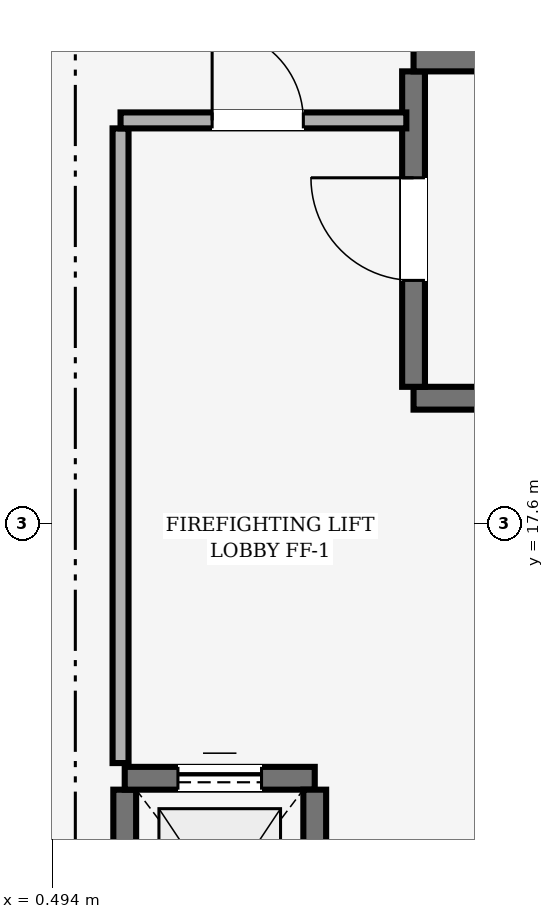
"""IFC4 building model, lengths in metres.
Left out: names, types, materials, properties, quantities, classifications, styles, units other than length and angle.
Written with IfcOpenShell. Run it as: python <this file> out.ifc"""

import sys

from ifc_helpers import new_model, si_unit, direction, frame, frame_2d, origin, place, context, subcontext, project, spatial, rectangle, extrude, element, fill, save


model = new_model("IFC4")
c1 = context("Model", 3, precision=1e-05, world=origin(), true_north=direction((0.0, 1.0)))
c2 = subcontext(c1, "Body", "Model", "MODEL_VIEW")
j1 = project(units=[si_unit("LENGTHUNIT", "METRE"), si_unit("PLANEANGLEUNIT", "RADIAN")], contexts=[c1])
p1 = place(None, origin())
s1 = spatial("IfcSite", under=j1, at=p1, CompositionType="ELEMENT")
p2 = place(p1, origin())
s2 = spatial("IfcBuilding", under=s1, at=p2, CompositionType="ELEMENT")
p3 = place(p2, frame((0.0, 0.0, 25.5)))
s3 = spatial("IfcBuildingStorey", under=s2, at=p3, CompositionType="ELEMENT", Elevation=25.5)
p4 = place(p3, frame((15.43, 19.25, 0.0), z_axis=(0.0, 0.0, 1.0), x_axis=(-1.0, 0.0, 0.0)))
e1 = element("IfcWall", 1, at=p4, inside=s3, PredefinedType="SHEAR", context=c2, shape_type="SweptSolid", body=[
    extrude(rectangle(XDim=10.18, YDim=0.3, at=frame_2d((5.09, 0.0))), origin(), (0.0, 0.0, 1.0), 2.91),
])
p5 = place(p3, frame((5.25, 19.4, 0.0), z_axis=(0.0, 0.0, 1.0), x_axis=(0.0, 1.0, 0.0)))
e2 = element("IfcWall", 2, at=p5, inside=s3, PredefinedType="SHEAR", context=c2, shape_type="SweptSolid", body=[
    extrude(rectangle(XDim=4.15, YDim=0.3, at=frame_2d((2.075, 0.0))), origin(), (0.0, 0.0, 1.0), 2.91),
])
p6 = place(p5, frame((1.4, 0.0, 0.0)))
e3 = element("IfcOpeningElement", 3, at=p6, cuts=e2, PredefinedType="OPENING", context=c2, shape_type="SweptSolid", body=[
    extrude(rectangle(XDim=1.35, YDim=2.2, at=frame_2d((0.675, 1.1))), frame((0.0, 0.15, 0.0), z_axis=(0.0, -1.0, 0.0), x_axis=(1.0, 0.0, 0.0)), (0.0, 0.0, 1.0), 0.3),
])
p7 = place(p3, frame((5.25, 23.7, 0.0), z_axis=(0.0, 0.0, 1.0), x_axis=(1.0, 0.0, 0.0)))
e4 = element("IfcWall", 4, at=p7, inside=s3, PredefinedType="SHEAR", context=c2, shape_type="SweptSolid", body=[
    extrude(rectangle(XDim=10.18, YDim=0.3, at=frame_2d((5.09, 0.0))), origin(), (0.0, 0.0, 1.0), 2.91),
])
p8 = place(p3, frame((1.45, 11.2, 0.0), z_axis=(0.0, 0.0, 1.0), x_axis=(0.0, 1.0, 0.0)))
e5 = element("IfcWall", 5, at=p8, inside=s3, PredefinedType="SHEAR", context=c2, shape_type="SweptSolid", body=[
    extrude(rectangle(XDim=2.9, YDim=0.3, at=frame_2d((1.45, 0.0))), origin(), (0.0, 0.0, 1.0), 2.91),
])
p9 = place(p3, frame((1.45, 14.25, 0.0), z_axis=(0.0, 0.0, 1.0), x_axis=(1.0, 0.0, 0.0)))
e6 = element("IfcWall", 6, at=p9, inside=s3, PredefinedType="SHEAR", context=c2, shape_type="SweptSolid", body=[
    extrude(rectangle(XDim=2.5, YDim=0.3, at=frame_2d((1.25, 0.0))), origin(), (0.0, 0.0, 1.0), 2.91),
])
p10 = place(p9, frame((0.7, 0.0, 0.0)))
e7 = element("IfcOpeningElement", 7, at=p10, cuts=e6, PredefinedType="OPENING", context=c2, shape_type="SweptSolid", body=[
    extrude(rectangle(XDim=1.1, YDim=2.1, at=frame_2d((0.55, 1.05))), frame((0.0, 0.15, 0.0), z_axis=(0.0, -1.0, 0.0), x_axis=(1.0, 0.0, 0.0)), (0.0, 0.0, 1.0), 0.3),
])
p11 = place(p3, frame((3.95, 14.1, 0.0), z_axis=(0.0, 0.0, 1.0), x_axis=(0.0, -1.0, 0.0)))
e8 = element("IfcWall", 8, at=p11, inside=s3, PredefinedType="SHEAR", context=c2, shape_type="SweptSolid", body=[
    extrude(rectangle(XDim=2.9, YDim=0.3, at=frame_2d((1.45, 0.0))), origin(), (0.0, 0.0, 1.0), 2.91),
])
p12 = place(p3, frame((1.395, 14.45, 0.0), z_axis=(0.0, 0.0, 1.0), x_axis=(0.0, 1.0, 0.0)))
e9 = element("IfcWall", 9, at=p12, inside=s3, PredefinedType="PARTITIONING", context=c2, shape_type="SweptSolid", body=[
    extrude(rectangle(XDim=8.35, YDim=0.21, at=frame_2d((4.175, 0.0))), origin(), (0.0, 0.0, 1.0), 2.89),
])
p13 = place(p3, frame((1.395, 22.905, 0.0), z_axis=(0.0, 0.0, 1.0), x_axis=(1.0, 0.0, 0.0)))
e10 = element("IfcWall", 10, at=p13, inside=s3, PredefinedType="PARTITIONING", context=c2, shape_type="SweptSolid", body=[
    extrude(rectangle(XDim=3.76, YDim=0.21, at=frame_2d((1.88, 0.0))), origin(), (0.0, 0.0, 1.0), 2.89),
])
p14 = place(p13, frame((1.205, 0.0, 0.0)))
e11 = element("IfcOpeningElement", 11, at=p14, cuts=e10, PredefinedType="OPENING", context=c2, shape_type="SweptSolid", body=[
    extrude(rectangle(XDim=1.2, YDim=2.15, at=frame_2d((0.6, 1.075))), frame((0.0, 0.105, 0.0), z_axis=(0.0, -1.0, 0.0), x_axis=(1.0, 0.0, 0.0)), (0.0, 0.0, 1.0), 0.21),
])
p15 = place(p6, origin())
e12 = element("IfcDoor", 12, at=p15, inside=s3, OperationType="SINGLE_SWING_RIGHT", PredefinedType="DOOR", context=c2, shape_type="SweptSolid", body=[
    extrude(rectangle(XDim=1.35, YDim=2.2, at=frame_2d((0.675, 1.1))), frame((0.0, 0.025, 0.0), z_axis=(0.0, -1.0, 0.0), x_axis=(1.0, 0.0, 0.0)), (0.0, 0.0, 1.0), 0.05),
])
fill(e3, e12)
p16 = place(p10, origin())
e13 = element("IfcDoor", 13, at=p16, inside=s3, OperationType="SLIDING_TO_LEFT", PredefinedType="DOOR", context=c2, shape_type="SweptSolid", body=[
    extrude(rectangle(XDim=1.1, YDim=2.1, at=frame_2d((0.55, 1.05))), frame((0.0, 0.025, 0.0), z_axis=(0.0, -1.0, 0.0), x_axis=(1.0, 0.0, 0.0)), (0.0, 0.0, 1.0), 0.05),
])
fill(e7, e13)
p17 = place(p14, origin())
e14 = element("IfcDoor", 14, at=p17, inside=s3, OperationType="SINGLE_SWING_LEFT", PredefinedType="DOOR", context=c2, shape_type="SweptSolid", body=[
    extrude(rectangle(XDim=1.2, YDim=2.15, at=frame_2d((0.6, 1.075))), frame((0.0, 0.025, 0.0), z_axis=(0.0, -1.0, 0.0), x_axis=(1.0, 0.0, 0.0)), (0.0, 0.0, 1.0), 0.05),
])
fill(e11, e14)
save(model, sys.argv[1])
